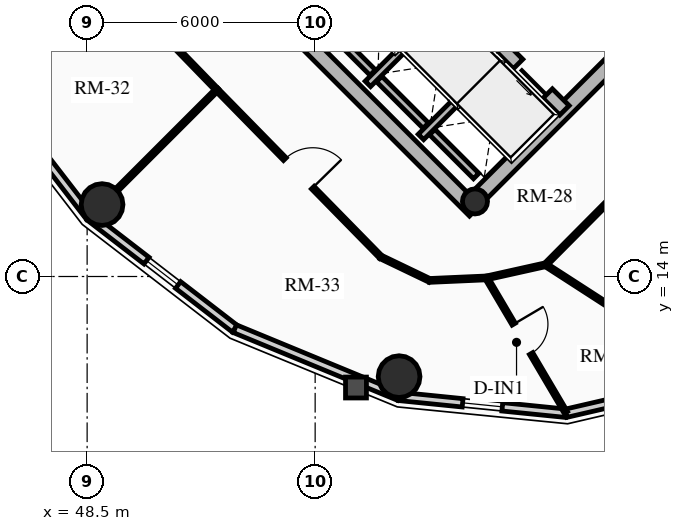
"""IFC4 building model, lengths in metres.
Left out: names, types, materials, properties, quantities, classifications, styles, units other than length and angle.
Written with IfcOpenShell. Run it as: python <this file> out.ifc"""

import sys

from ifc_helpers import new_model, si_unit, direction, frame, frame_2d, origin, origin_2d, place, context, subcontext, project, spatial, rectangle, circle, hollow_circle, extrude, source, transform, mapped, element, fill, save


model = new_model("IFC4")
c1 = context("Model", 3, precision=1e-05, world=origin(), true_north=direction((0.0, 1.0)))
c2 = subcontext(c1, "Body", "Model", "MODEL_VIEW")
j1 = project(units=[si_unit("LENGTHUNIT", "METRE"), si_unit("PLANEANGLEUNIT", "RADIAN")], contexts=[c1])
p1 = place(None, origin())
s1 = spatial("IfcSite", under=j1, at=p1, CompositionType="ELEMENT")
p2 = place(p1, origin())
s2 = spatial("IfcBuilding", under=s1, at=p2, CompositionType="ELEMENT")
p3 = place(p2, frame((0.0, 0.0, 229.25)))
s3 = spatial("IfcBuildingStorey", under=s2, at=p3, CompositionType="ELEMENT", Elevation=229.25)
p4 = place(p3, frame((58.702, 15.732, 0.0), z_axis=(0.0, 0.0, 1.0), x_axis=(-0.707106781187, 0.707106781187, 0.0)))
e1 = element("IfcWall", 1, at=p4, inside=s3, PredefinedType="SHEAR", context=c2, shape_type="SweptSolid", body=[
    extrude(rectangle(XDim=14.1, YDim=0.4, at=frame_2d((7.05, 0.0))), origin(), (0.0, 0.0, 1.0), 3.2),
])
p5 = place(p3, frame((58.561, 15.873, 0.0), z_axis=(0.0, 0.0, 1.0), x_axis=(0.707106781187, 0.707106781187, 0.0)))
e2 = element("IfcWall", 2, at=p5, inside=s3, PredefinedType="SHEAR", context=c2, shape_type="SweptSolid", body=[
    extrude(rectangle(XDim=10.7, YDim=0.4, at=frame_2d((5.35, 0.0))), origin(), (0.0, 0.0, 1.0), 3.2),
])
m1 = source(origin(), c2, "Body", "SweptSolid", [
    extrude(rectangle(XDim=1.5, YDim=2.02, at=frame_2d((0.75, 1.01))), frame((0.0, 0.21, 0.0), z_axis=(0.0, -1.0, 0.0), x_axis=(1.0, 0.0, 0.0)), (0.0, 0.0, 1.0), 0.42),
])
p6 = place(p5, frame((5.45, 0.0, 0.0)))
e3 = element("IfcOpeningElement", 3, at=p6, cuts=e2, PredefinedType="OPENING", context=c2, shape_type="MappedRepresentation", body=[
    mapped(m1, transform((0.0, 0.0, 0.0), x_axis=(1.0, 0.0, 0.0), y_axis=(0.0, 1.0, 0.0), z_axis=(0.0, 0.0, 1.0), scale=1.0)),
])
p7 = place(p3, frame((61.06, 18.373, 0.0), z_axis=(0.0, 0.0, 1.0), x_axis=(-0.707106781187, 0.707106781187, 0.0)))
e4 = element("IfcWall", 4, at=p7, inside=s3, PredefinedType="SHEAR", context=c2, shape_type="SweptSolid", body=[
    extrude(rectangle(XDim=13.7, YDim=0.35, at=frame_2d((6.85, 0.0))), origin(), (0.0, 0.0, 1.0), 3.2),
])
m2 = source(origin(), c2, "Body", "SweptSolid", [
    extrude(rectangle(XDim=1.1, YDim=2.015, at=frame_2d((0.55, 1.007))), frame((0.0, 0.185, 0.0), z_axis=(0.0, -1.0, 0.0), x_axis=(1.0, 0.0, 0.0)), (0.0, 0.0, 1.0), 0.37),
])
p8 = place(p7, frame((4.85, 0.0, 0.0)))
e5 = element("IfcOpeningElement", 5, at=p8, cuts=e4, PredefinedType="OPENING", context=c2, shape_type="MappedRepresentation", body=[
    mapped(m2, transform((0.0, 0.0, 0.0), x_axis=(1.0, 0.0, 0.0), y_axis=(0.0, 1.0, 0.0), z_axis=(0.0, 0.0, 1.0), scale=1.0)),
])
p9 = place(p7, frame((0.625, 0.0, 0.0)))
e6 = element("IfcOpeningElement", 6, at=p9, cuts=e4, PredefinedType="OPENING", context=c2, shape_type="MappedRepresentation", body=[
    mapped(m2, transform((0.0, 0.0, 0.0), x_axis=(1.0, 0.0, 0.0), y_axis=(0.0, 1.0, 0.0), z_axis=(0.0, 0.0, 1.0), scale=1.0)),
])
p10 = place(p7, frame((2.625, 0.0, 0.0)))
e7 = element("IfcOpeningElement", 7, at=p10, cuts=e4, PredefinedType="OPENING", context=c2, shape_type="MappedRepresentation", body=[
    mapped(m2, transform((0.0, 0.0, 0.0), x_axis=(1.0, 0.0, 0.0), y_axis=(0.0, 1.0, 0.0), z_axis=(0.0, 0.0, 1.0), scale=1.0)),
])
m3 = source(origin(), c2, "Body", "SweptSolid", [
    extrude(rectangle(XDim=1.15, YDim=2.02, at=frame_2d((0.575, 1.01))), frame((0.0, 0.185, 0.0), z_axis=(0.0, -1.0, 0.0), x_axis=(1.0, 0.0, 0.0)), (0.0, 0.0, 1.0), 0.37),
])
p11 = place(p7, frame((7.27, 0.0, 0.0)))
e8 = element("IfcOpeningElement", 8, at=p11, cuts=e4, PredefinedType="OPENING", context=c2, shape_type="MappedRepresentation", body=[
    mapped(m3, transform((0.0, 0.0, 0.0), x_axis=(1.0, 0.0, 0.0), y_axis=(0.0, 1.0, 0.0), z_axis=(0.0, 0.0, 1.0), scale=1.0)),
])
p12 = place(p3, frame((58.706, 15.976, 0.0), z_axis=(0.0, 0.0, 1.0), x_axis=(0.707106781187, 0.707106781187, 0.0)))
e9 = element("IfcColumn", 9, at=p12, inside=s3, PredefinedType="COLUMN", context=c2, shape_type="SweptSolid", body=[
    extrude(hollow_circle(Radius=0.33, WallThickness=0.025, at=origin_2d()), origin(), (0.0, 0.0, 1.0), 3.2),
])
for number, where, z_axis, x_axis in (
    (10, (48.893, 15.893, 0.0), (0.0, 0.0, 1.0), (1.0, 0.0, 0.0)),
    (11, (56.709, 11.365, 0.0), (0.0, 0.0, 1.0), (1.0, 0.0, 0.0)),
):
    element("IfcColumn", number, at=place(p3, frame(where, z_axis=z_axis, x_axis=x_axis)), inside=s3, PredefinedType="USERDEFINED", context=c2, shape_type="SweptSolid", body=[
        extrude(circle(Radius=0.55, at=origin_2d()), origin(), (0.0, 0.0, 1.0), 3.2),
    ])
p13 = place(p3, frame((48.569, 15.569, 0.0), z_axis=(0.0, 0.0, 1.0), x_axis=(-0.610523083886, 0.791998462147, 0.0)))
e12 = element("IfcWall", 12, at=p13, inside=s3, PredefinedType="SOLIDWALL", context=c2, shape_type="SweptSolid", body=[
    extrude(rectangle(XDim=4.82, YDim=0.22, at=frame_2d((2.41, 0.0))), origin(), (0.0, 0.0, 1.0), 2.612),
])
p14 = place(p3, frame((52.387, 12.626, 0.0), z_axis=(0.0, 0.0, 1.0), x_axis=(-0.791998462147, 0.610523083886, 0.0)))
e13 = element("IfcWall", 13, at=p14, inside=s3, PredefinedType="SOLIDWALL", context=c2, shape_type="SweptSolid", body=[
    extrude(rectangle(XDim=4.82, YDim=0.22, at=frame_2d((2.41, 0.0))), origin(), (0.0, 0.0, 1.0), 2.612),
])
m4 = source(origin(), c2, "Body", "SweptSolid", [
    extrude(rectangle(XDim=1.05, YDim=1.3, at=frame_2d((0.525, 0.65))), frame((0.0, 0.12, 0.0), z_axis=(0.0, -1.0, 0.0), x_axis=(1.0, 0.0, 0.0)), (0.0, 0.0, 1.0), 0.24),
])
p15 = place(p14, frame((1.885, 0.0, 0.65)))
e14 = element("IfcOpeningElement", 14, at=p15, cuts=e13, PredefinedType="OPENING", context=c2, shape_type="MappedRepresentation", body=[
    mapped(m4, transform((0.0, 0.0, 0.0), x_axis=(1.0, 0.0, 0.0), y_axis=(0.0, 1.0, 0.0), z_axis=(0.0, 0.0, 1.0), scale=1.0)),
])
p16 = place(p3, frame((56.705, 10.845, 0.0), z_axis=(0.0, 0.0, 1.0), x_axis=(-0.924447353237, 0.381309704956, 0.0)))
e15 = element("IfcWall", 15, at=p16, inside=s3, PredefinedType="SOLIDWALL", context=c2, shape_type="SweptSolid", body=[
    extrude(rectangle(XDim=4.671, YDim=0.22, at=frame_2d((2.335, 0.0))), origin(), (0.0, 0.0, 1.0), 2.612),
])
p17 = place(p3, frame((61.1, 10.401, 0.0), z_axis=(0.0, 0.0, 1.0), x_axis=(-0.994929930991, 0.100570534541, 0.0)))
e16 = element("IfcWall", 16, at=p17, inside=s3, PredefinedType="SOLIDWALL", context=c2, shape_type="SweptSolid", body=[
    extrude(rectangle(XDim=4.418, YDim=0.22, at=frame_2d((2.209, 0.0))), origin(), (0.0, 0.0, 1.0), 2.612),
])
p18 = place(p17, frame((1.684, 0.0, 0.65)))
e17 = element("IfcOpeningElement", 17, at=p18, cuts=e16, PredefinedType="OPENING", context=c2, shape_type="MappedRepresentation", body=[
    mapped(m4, transform((0.0, 0.0, 0.0), x_axis=(1.0, 0.0, 0.0), y_axis=(0.0, 1.0, 0.0), z_axis=(0.0, 0.0, 1.0), scale=1.0)),
])
p19 = place(p3, frame((65.144, 11.337, 0.0), z_axis=(0.0, 0.0, 1.0), x_axis=(-0.974249228678, -0.225473813158, 0.0)))
e18 = element("IfcWall", 18, at=p19, inside=s3, PredefinedType="SOLIDWALL", context=c2, shape_type="SweptSolid", body=[
    extrude(rectangle(XDim=4.15, YDim=0.22, at=frame_2d((2.075, 0.0))), origin(), (0.0, 0.0, 1.0), 2.612),
])
p20 = place(p19, frame((1.55, 0.0, 0.65)))
e19 = element("IfcOpeningElement", 19, at=p20, cuts=e18, PredefinedType="OPENING", context=c2, shape_type="MappedRepresentation", body=[
    mapped(m4, transform((0.0, 0.0, 0.0), x_axis=(1.0, 0.0, 0.0), y_axis=(0.0, 1.0, 0.0), z_axis=(0.0, 0.0, 1.0), scale=1.0)),
])
p21 = place(p3, frame((55.888, 19.069, 0.0), z_axis=(0.0, 0.0, 1.0), x_axis=(0.707106781187, 0.707106781187, 0.0)))
e20 = element("IfcWall", 20, at=p21, inside=s3, PredefinedType="SHEAR", context=c2, shape_type="SweptSolid", body=[
    extrude(rectangle(XDim=2.97, YDim=0.2, at=frame_2d((1.485, 0.0))), origin(), (0.0, 0.0, 1.0), 3.2),
])
p22 = place(p3, frame((56.015, 19.366, 0.0), z_axis=(0.0, 0.0, 1.0), x_axis=(-0.707106781187, 0.707106781187, 0.0)))
e21 = element("IfcWall", 21, at=p22, inside=s3, PredefinedType="SHEAR", context=c2, shape_type="SweptSolid", body=[
    extrude(rectangle(XDim=2.44, YDim=0.2, at=frame_2d((1.22, 0.0))), origin(), (0.0, 0.0, 1.0), 3.2),
])
p23 = place(p3, frame((57.284, 17.673, 0.0), z_axis=(0.0, 0.0, 1.0), x_axis=(0.707147878904, 0.70706568108, 0.0)))
e22 = element("IfcWall", 22, at=p23, inside=s3, PredefinedType="SHEAR", context=c2, shape_type="SweptSolid", body=[
    extrude(rectangle(XDim=2.97, YDim=0.2, at=frame_2d((1.485, 0.0))), origin(), (0.0, 0.0, 1.0), 3.2),
])
p24 = place(p3, frame((57.412, 17.97, 0.0), z_axis=(0.0, 0.0, 1.0), x_axis=(-0.707106781187, 0.707106781187, 0.0)))
e23 = element("IfcWall", 23, at=p24, inside=s3, PredefinedType="SHEAR", context=c2, shape_type="SweptSolid", body=[
    extrude(rectangle(XDim=1.735, YDim=0.2, at=frame_2d((0.867, 0.0))), origin(), (0.0, 0.0, 1.0), 3.2),
])
p25 = place(p3, frame((58.737, 16.644, 0.0), z_axis=(0.0, 0.0, 1.0), x_axis=(-0.707032117043, 0.707181437447, 0.0)))
e24 = element("IfcWall", 24, at=p25, inside=s3, PredefinedType="SHEAR", context=c2, shape_type="SweptSolid", body=[
    extrude(rectangle(XDim=1.635, YDim=0.2, at=frame_2d((0.817, 0.0))), origin(), (0.0, 0.0, 1.0), 3.2),
])
p26 = place(p3, frame((47.706, 23.253, 0.0), z_axis=(0.0, 0.0, 1.0), x_axis=(0.696179266346, -0.717867974707, 0.0)))
e25 = element("IfcWall", 25, at=p26, inside=s3, PredefinedType="MOVABLE", context=c2, shape_type="SweptSolid", body=[
    extrude(rectangle(XDim=6.045, YDim=0.1, at=frame_2d((3.022, 0.0))), origin(), (0.0, 0.0, 1.0), 2.545),
])
p27 = place(p3, frame((51.914, 18.914, 0.0), z_axis=(0.0, 0.0, 1.0), x_axis=(0.699999313799, -0.714143515465, 0.0)))
e26 = element("IfcWall", 26, at=p27, inside=s3, PredefinedType="MOVABLE", context=c2, shape_type="SweptSolid", body=[
    extrude(rectangle(XDim=6.162, YDim=0.1, at=frame_2d((3.081, 0.0))), origin(), (0.0, 0.0, 1.0), 2.545),
])
m5 = source(origin(), c2, "Body", "SweptSolid", [
    extrude(rectangle(XDim=1.05, YDim=2.015, at=frame_2d((0.525, 1.007))), frame((0.0, 0.06, 0.0), z_axis=(0.0, -1.0, 0.0), x_axis=(1.0, 0.0, 0.0)), (0.0, 0.0, 1.0), 0.12),
])
p28 = place(p27, frame((2.556, 0.0, 0.0)))
e27 = element("IfcOpeningElement", 27, at=p28, cuts=e26, PredefinedType="OPENING", context=c2, shape_type="MappedRepresentation", body=[
    mapped(m5, transform((0.0, 0.0, 0.0), x_axis=(1.0, 0.0, 0.0), y_axis=(0.0, 1.0, 0.0), z_axis=(0.0, 0.0, 1.0), scale=1.0)),
])
p29 = place(p3, frame((56.227, 14.513, 0.0), z_axis=(0.0, 0.0, 1.0), x_axis=(0.901477579283, -0.432825801044, 0.0)))
e28 = element("IfcWall", 28, at=p29, inside=s3, PredefinedType="MOVABLE", context=c2, shape_type="SweptSolid", body=[
    extrude(rectangle(XDim=1.424, YDim=0.1, at=frame_2d((0.712, 0.0))), origin(), (0.0, 0.0, 1.0), 2.545),
])
p30 = place(p3, frame((57.511, 13.897, 0.0), z_axis=(0.0, 0.0, 1.0), x_axis=(0.999024538494, 0.044158481476, 0.0)))
e29 = element("IfcWall", 29, at=p30, inside=s3, PredefinedType="MOVABLE", context=c2, shape_type="SweptSolid", body=[
    extrude(rectangle(XDim=1.498, YDim=0.1, at=frame_2d((0.749, 0.0))), origin(), (0.0, 0.0, 1.0), 2.612),
])
p31 = place(p3, frame((59.008, 13.963, 0.0), z_axis=(0.0, 0.0, 1.0), x_axis=(0.976020856791, 0.21767702476, 0.0)))
e30 = element("IfcWall", 30, at=p31, inside=s3, PredefinedType="MOVABLE", context=c2, shape_type="SweptSolid", body=[
    extrude(rectangle(XDim=1.593, YDim=0.1, at=frame_2d((0.796, 0.0))), origin(), (0.0, 0.0, 1.0), 2.545),
])
p32 = place(p3, frame((60.562, 14.31, 0.0), z_axis=(0.0, 0.0, 1.0), x_axis=(0.704566236161, 0.709638230975, 0.0)))
e31 = element("IfcWall", 31, at=p32, inside=s3, PredefinedType="MOVABLE", context=c2, shape_type="SweptSolid", body=[
    extrude(rectangle(XDim=3.321, YDim=0.1, at=frame_2d((1.661, 0.0))), origin(), (0.0, 0.0, 1.0), 2.612),
])
p33 = place(p3, frame((51.914, 18.914, 0.0), z_axis=(0.0, 0.0, 1.0), x_axis=(-0.707106781187, -0.707106781187, 0.0)))
e32 = element("IfcWall", 32, at=p33, inside=s3, PredefinedType="MOVABLE", context=c2, shape_type="SweptSolid", body=[
    extrude(rectangle(XDim=4.71, YDim=0.1, at=frame_2d((2.355, 0.0))), origin(), (0.0, 0.0, 1.0), 2.612),
])
p34 = place(p3, frame((60.562, 14.31, 0.0), z_axis=(0.0, 0.0, 1.0), x_axis=(0.839858797161, -0.542804938105, 0.0)))
e33 = element("IfcWall", 33, at=p34, inside=s3, PredefinedType="MOVABLE", context=c2, shape_type="SweptSolid", body=[
    extrude(rectangle(XDim=5.444, YDim=0.1, at=frame_2d((2.722, 0.0))), origin(), (0.0, 0.0, 1.0), 2.612),
])
p35 = place(p3, frame((47.706, 23.253, 0.0), z_axis=(0.0, 0.0, 1.0), x_axis=(-0.471384756618, -0.881927667799, 0.0)))
e34 = element("IfcWall", 34, at=p35, inside=s3, PredefinedType="MOVABLE", context=c2, shape_type="SweptSolid", body=[
    extrude(rectangle(XDim=4.374, YDim=0.1, at=frame_2d((2.187, 0.0))), origin(), (0.0, 0.0, 1.0), 2.545),
])
m6 = source(origin(), c2, "Body", "SweptSolid", [
    extrude(rectangle(XDim=0.9, YDim=2.005, at=frame_2d((0.45, 1.002))), frame((0.0, 0.06, 0.0), z_axis=(0.0, -1.0, 0.0), x_axis=(1.0, 0.0, 0.0)), (0.0, 0.0, 1.0), 0.12),
])
p36 = place(p35, frame((1.674, 0.0, 0.0)))
e35 = element("IfcOpeningElement", 35, at=p36, cuts=e34, PredefinedType="OPENING", context=c2, shape_type="MappedRepresentation", body=[
    mapped(m6, transform((0.0, 0.0, 0.0), x_axis=(1.0, 0.0, 0.0), y_axis=(0.0, 1.0, 0.0), z_axis=(0.0, 0.0, 1.0), scale=1.0)),
])
p37 = place(p3, frame((59.008, 13.963, 0.0), z_axis=(0.0, 0.0, 1.0), x_axis=(0.508047134864, -0.86132926849, 0.0)))
e36 = element("IfcWall", 36, at=p37, inside=s3, PredefinedType="MOVABLE", context=c2, shape_type="SweptSolid", body=[
    extrude(rectangle(XDim=4.113, YDim=0.1, at=frame_2d((2.056, 0.0))), origin(), (0.0, 0.0, 1.0), 2.545),
])
p38 = place(p37, frame((1.413, 0.0, 0.0)))
e37 = element("IfcOpeningElement", 37, at=p38, cuts=e36, PredefinedType="OPENING", context=c2, shape_type="MappedRepresentation", body=[
    mapped(m6, transform((0.0, 0.0, 0.0), x_axis=(1.0, 0.0, 0.0), y_axis=(0.0, 1.0, 0.0), z_axis=(0.0, 0.0, 1.0), scale=1.0)),
])
m7 = source(origin(), c2, "Body", "SweptSolid", [
    extrude(rectangle(XDim=1.05, YDim=1.3, at=frame_2d((0.525, 0.65))), frame((0.0, 0.03, 0.0), z_axis=(0.0, -1.0, 0.0), x_axis=(1.0, 0.0, 0.0)), (0.0, 0.0, 1.0), 0.06),
])
p39 = place(p15, origin())
e38 = element("IfcWindow", 38, at=p39, inside=s3, PartitioningType="SINGLE_PANEL", PredefinedType="WINDOW", context=c2, shape_type="MappedRepresentation", body=[
    mapped(m7, transform((0.0, 0.0, 0.0), x_axis=(1.0, 0.0, 0.0), y_axis=(0.0, 1.0, 0.0), z_axis=(0.0, 0.0, 1.0), scale=1.0)),
])
fill(e14, e38)
p40 = place(p18, origin())
e39 = element("IfcWindow", 39, at=p40, inside=s3, PartitioningType="SINGLE_PANEL", PredefinedType="WINDOW", context=c2, shape_type="MappedRepresentation", body=[
    mapped(m7, transform((0.0, 0.0, 0.0), x_axis=(1.0, 0.0, 0.0), y_axis=(0.0, 1.0, 0.0), z_axis=(0.0, 0.0, 1.0), scale=1.0)),
])
fill(e17, e39)
m8 = source(origin(), c2, "Body", "SweptSolid", [
    extrude(rectangle(XDim=1.1, YDim=2.015, at=frame_2d((0.55, 1.007))), frame((0.0, 0.025, 0.0), z_axis=(0.0, -1.0, 0.0), x_axis=(1.0, 0.0, 0.0)), (0.0, 0.0, 1.0), 0.05),
])
p41 = place(p9, origin())
e40 = element("IfcDoor", 40, at=p41, inside=s3, OperationType="SLIDING_TO_LEFT", PredefinedType="DOOR", context=c2, shape_type="MappedRepresentation", body=[
    mapped(m8, transform((0.0, 0.0, 0.0), x_axis=(1.0, 0.0, 0.0), y_axis=(0.0, 1.0, 0.0), z_axis=(0.0, 0.0, 1.0), scale=1.0)),
])
fill(e6, e40)
m9 = source(origin(), c2, "Body", "SweptSolid", [
    extrude(rectangle(XDim=1.05, YDim=2.015, at=frame_2d((0.525, 1.007))), frame((0.0, 0.025, 0.0), z_axis=(0.0, -1.0, 0.0), x_axis=(1.0, 0.0, 0.0)), (0.0, 0.0, 1.0), 0.05),
])
p42 = place(p28, origin())
e41 = element("IfcDoor", 41, at=p42, inside=s3, OperationType="SINGLE_SWING_RIGHT", PredefinedType="DOOR", context=c2, shape_type="MappedRepresentation", body=[
    mapped(m9, transform((0.0, 0.0, 0.0), x_axis=(1.0, 0.0, 0.0), y_axis=(0.0, 1.0, 0.0), z_axis=(0.0, 0.0, 1.0), scale=1.0)),
])
fill(e27, e41)
m10 = source(origin(), c2, "Body", "SweptSolid", [
    extrude(rectangle(XDim=0.9, YDim=2.005, at=frame_2d((0.45, 1.002))), frame((0.0, 0.025, 0.0), z_axis=(0.0, -1.0, 0.0), x_axis=(1.0, 0.0, 0.0)), (0.0, 0.0, 1.0), 0.05),
])
p43 = place(p38, origin())
e42 = element("IfcDoor", 42, at=p43, inside=s3, OperationType="SINGLE_SWING_LEFT", PredefinedType="DOOR", context=c2, shape_type="MappedRepresentation", body=[
    mapped(m10, transform((0.0, 0.0, 0.0), x_axis=(1.0, 0.0, 0.0), y_axis=(0.0, 1.0, 0.0), z_axis=(0.0, 0.0, 1.0), scale=1.0)),
])
fill(e37, e42)
save(model, sys.argv[1])
